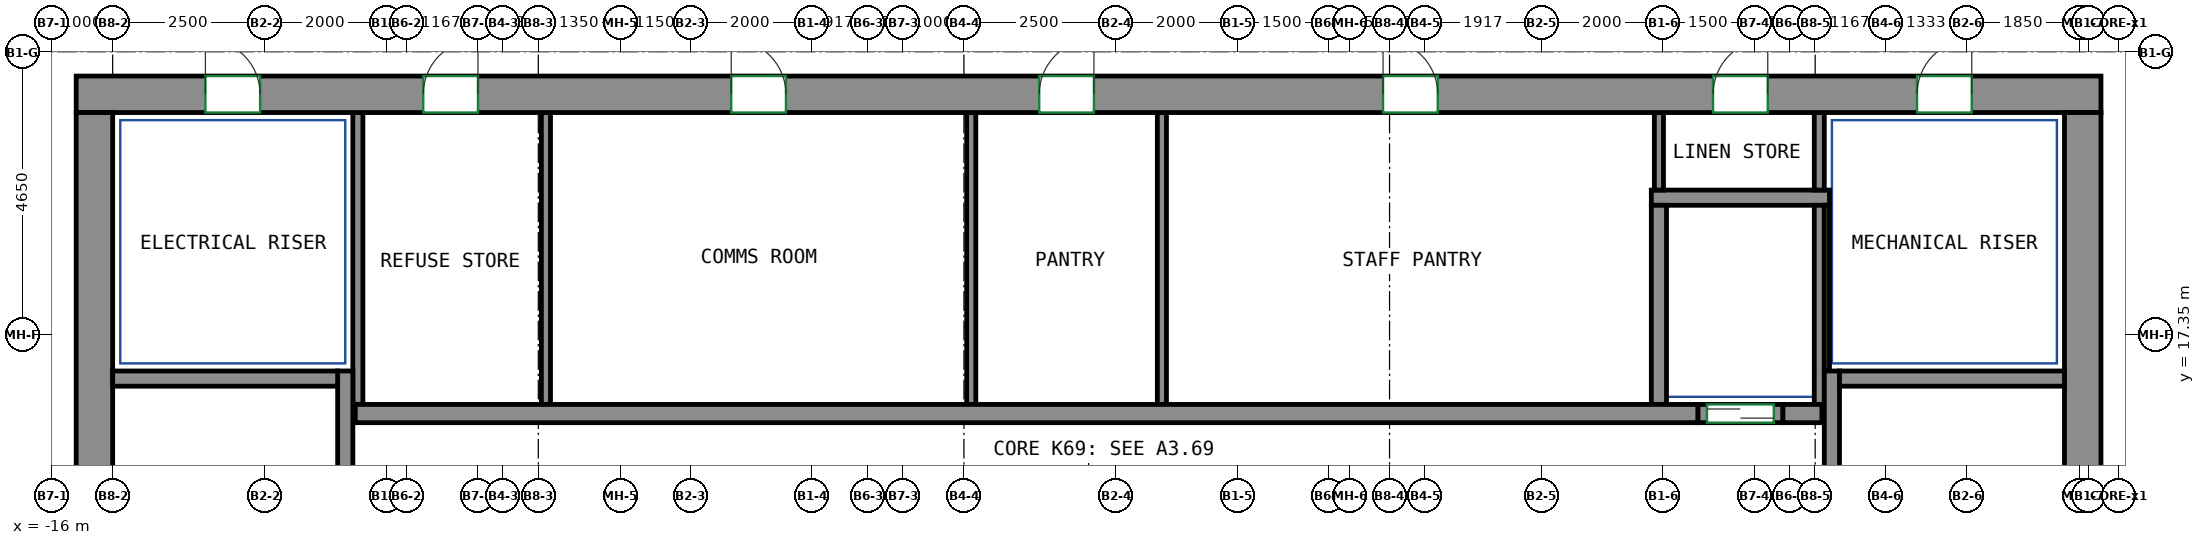
"""IFC4 building model, lengths in metres.
Left out: names, types, materials, properties, quantities, classifications, styles, units other than length and angle.
Written with IfcOpenShell. Run it as: python <this file> out.ifc"""

import sys

from ifc_helpers import new_model, si_unit, direction, frame, frame_2d, origin, place, context, subcontext, project, spatial, rectangle, extrude, source, transform, mapped, element, fill, save


model = new_model("IFC4")
c1 = context("Model", 3, precision=1e-05, world=origin(), true_north=direction((0.0, 1.0)))
c2 = subcontext(c1, "Body", "Model", "MODEL_VIEW")
j1 = project(units=[si_unit("LENGTHUNIT", "METRE"), si_unit("PLANEANGLEUNIT", "RADIAN")], contexts=[c1])
p1 = place(None, origin())
s1 = spatial("IfcSite", under=j1, at=p1, CompositionType="ELEMENT")
p2 = place(p1, origin())
s2 = spatial("IfcBuilding", under=s1, at=p2, CompositionType="ELEMENT")
p3 = place(p2, frame((0.0, 0.0, 277.2)))
s3 = spatial("IfcBuildingStorey", under=s2, at=p3, CompositionType="ELEMENT", Elevation=277.2)
m1 = source(origin(), c2, "Body", "SweptSolid", [
    extrude(rectangle(XDim=33.3, YDim=0.6, at=frame_2d((16.65, 0.0))), origin(), (0.0, 0.0, 1.0), 3.12),
])
p4 = place(p3, frame((-15.6, 21.3, 0.0), z_axis=(0.0, 0.0, 1.0), x_axis=(1.0, 0.0, 0.0)))
e1 = element("IfcWall", 1, at=p4, inside=s3, PredefinedType="SHEAR", context=c2, shape_type="MappedRepresentation", body=[
    mapped(m1, transform((0.0, 0.0, 0.0))),
])
p5 = place(p4, frame((5.708, 0.0, 0.0)))
e2 = element("IfcOpeningElement", 2, at=p5, cuts=e1, PredefinedType="OPENING", context=c2, shape_type="SweptSolid", body=[
    extrude(rectangle(XDim=0.9, YDim=2.1, at=frame_2d((0.45, 1.05))), frame((0.0, 0.31, 0.0), z_axis=(0.0, -1.0, 0.0), x_axis=(1.0, 0.0, 0.0)), (0.0, 0.0, 1.0), 0.62),
])
p6 = place(p4, frame((10.773, 0.0, 0.0)))
e3 = element("IfcOpeningElement", 3, at=p6, cuts=e1, PredefinedType="OPENING", context=c2, shape_type="SweptSolid", body=[
    extrude(rectangle(XDim=0.9, YDim=2.1, at=frame_2d((0.45, 1.05))), frame((0.0, 0.31, 0.0), z_axis=(0.0, -1.0, 0.0), x_axis=(1.0, 0.0, 0.0)), (0.0, 0.0, 1.0), 0.62),
])
p7 = place(p4, frame((15.838, 0.0, 0.0)))
e4 = element("IfcOpeningElement", 4, at=p7, cuts=e1, PredefinedType="OPENING", context=c2, shape_type="SweptSolid", body=[
    extrude(rectangle(XDim=0.9, YDim=2.1, at=frame_2d((0.45, 1.05))), frame((0.0, 0.31, 0.0), z_axis=(0.0, -1.0, 0.0), x_axis=(1.0, 0.0, 0.0)), (0.0, 0.0, 1.0), 0.62),
])
p8 = place(p4, frame((21.493, 0.0, 0.0)))
e5 = element("IfcOpeningElement", 5, at=p8, cuts=e1, PredefinedType="OPENING", context=c2, shape_type="SweptSolid", body=[
    extrude(rectangle(XDim=0.9, YDim=2.1, at=frame_2d((0.45, 1.05))), frame((0.0, 0.31, 0.0), z_axis=(0.0, -1.0, 0.0), x_axis=(1.0, 0.0, 0.0)), (0.0, 0.0, 1.0), 0.62),
])
p9 = place(p4, frame((26.92, 0.0, 0.0)))
e6 = element("IfcOpeningElement", 6, at=p9, cuts=e1, PredefinedType="OPENING", context=c2, shape_type="SweptSolid", body=[
    extrude(rectangle(XDim=0.9, YDim=2.1, at=frame_2d((0.45, 1.05))), frame((0.0, 0.31, 0.0), z_axis=(0.0, -1.0, 0.0), x_axis=(1.0, 0.0, 0.0)), (0.0, 0.0, 1.0), 0.62),
])
p10 = place(p4, frame((2.125, 0.0, 0.0)))
e7 = element("IfcOpeningElement", 7, at=p10, cuts=e1, PredefinedType="OPENING", context=c2, shape_type="SweptSolid", body=[
    extrude(rectangle(XDim=0.9, YDim=2.1, at=frame_2d((0.45, 1.05))), frame((0.0, 0.31, 0.0), z_axis=(0.0, -1.0, 0.0), x_axis=(1.0, 0.0, 0.0)), (0.0, 0.0, 1.0), 0.62),
])
p11 = place(p4, frame((30.275, 0.0, 0.0)))
e8 = element("IfcOpeningElement", 8, at=p11, cuts=e1, PredefinedType="OPENING", context=c2, shape_type="SweptSolid", body=[
    extrude(rectangle(XDim=0.9, YDim=2.1, at=frame_2d((0.45, 1.05))), frame((0.0, 0.31, 0.0), z_axis=(0.0, -1.0, 0.0), x_axis=(1.0, 0.0, 0.0)), (0.0, 0.0, 1.0), 0.62),
])
m2 = source(origin(), c2, "Body", "SweptSolid", [
    extrude(rectangle(XDim=12.0, YDim=0.6, at=frame_2d((6.0, 0.0))), origin(), (0.0, 0.0, 1.0), 3.12),
])
for number, where, z_axis, x_axis in (
    (9, (-15.3, 9.0, 0.0), (0.0, 0.0, 1.0), (0.0, 1.0, 0.0)),
    (10, (17.4, 9.0, 0.0), (0.0, 0.0, 1.0), (0.0, 1.0, 0.0)),
):
    element("IfcWall", number, at=place(p3, frame(where, z_axis=z_axis, x_axis=x_axis)), inside=s3, PredefinedType="SHEAR", context=c2, shape_type="MappedRepresentation", body=[
        mapped(m2, transform((0.0, 0.0, 0.0))),
    ])
m3 = source(origin(), c2, "Body", "SweptSolid", [
    extrude(rectangle(XDim=7.75, YDim=0.25, at=frame_2d((3.875, 0.0))), origin(), (0.0, 0.0, 1.0), 3.12),
])
p12 = place(p3, frame((-11.175, 9.0, 0.0), z_axis=(0.0, 0.0, 1.0), x_axis=(0.0, 1.0, 0.0)))
e11 = element("IfcWall", 11, at=p12, inside=s3, PredefinedType="SHEAR", context=c2, shape_type="MappedRepresentation", body=[
    mapped(m3, transform((0.0, 0.0, 0.0))),
])
m4 = source(origin(), c2, "Body", "SweptSolid", [
    extrude(rectangle(XDim=3.7, YDim=0.25, at=frame_2d((1.85, 0.0))), origin(), (0.0, 0.0, 1.0), 3.12),
])
p13 = place(p3, frame((-15.0, 16.625, 0.0), z_axis=(0.0, 0.0, 1.0), x_axis=(1.0, 0.0, 0.0)))
e12 = element("IfcWall", 12, at=p13, inside=s3, PredefinedType="SHEAR", context=c2, shape_type="MappedRepresentation", body=[
    mapped(m4, transform((0.0, 0.0, 0.0))),
])
p14 = place(p3, frame((13.275, 9.0, 0.0), z_axis=(0.0, 0.0, 1.0), x_axis=(0.0, 1.0, 0.0)))
e13 = element("IfcWall", 13, at=p14, inside=s3, PredefinedType="SHEAR", context=c2, shape_type="MappedRepresentation", body=[
    mapped(m3, transform((0.0, 0.0, 0.0))),
])
m5 = source(origin(), c2, "Body", "SweptSolid", [
    extrude(rectangle(XDim=3.7, YDim=0.25, at=frame_2d((1.85, 0.0))), origin(), (0.0, 0.0, 1.0), 3.12),
])
p15 = place(p3, frame((13.4, 16.625, 0.0), z_axis=(0.0, 0.0, 1.0), x_axis=(1.0, 0.0, 0.0)))
e14 = element("IfcWall", 14, at=p15, inside=s3, PredefinedType="SHEAR", context=c2, shape_type="MappedRepresentation", body=[
    mapped(m5, transform((0.0, 0.0, 0.0))),
])
m6 = source(origin(), c2, "Body", "SweptSolid", [
    extrude(rectangle(XDim=22.08, YDim=0.3, at=frame_2d((11.04, 0.0))), origin(), (0.0, 0.0, 1.0), 3.12),
])
p16 = place(p3, frame((-11.01, 16.05, 0.0), z_axis=(0.0, 0.0, 1.0), x_axis=(1.0, 0.0, 0.0)))
e15 = element("IfcWall", 15, at=p16, inside=s3, PredefinedType="SHEAR", context=c2, shape_type="MappedRepresentation", body=[
    mapped(m6, transform((0.0, 0.0, 0.0))),
])
m7 = source(origin(), c2, "Body", "SweptSolid", [
    extrude(rectangle(XDim=0.64, YDim=0.3, at=frame_2d((0.32, 0.0))), origin(), (0.0, 0.0, 1.0), 3.12),
])
p17 = place(p3, frame((12.47, 16.05, 0.0), z_axis=(0.0, 0.0, 1.0), x_axis=(1.0, 0.0, 0.0)))
e16 = element("IfcWall", 16, at=p17, inside=s3, PredefinedType="SHEAR", context=c2, shape_type="MappedRepresentation", body=[
    mapped(m7, transform((0.0, 0.0, 0.0))),
])
m8 = source(origin(), c2, "Body", "SweptSolid", [
    extrude(rectangle(XDim=1.4, YDim=0.3, at=frame_2d((0.7, 0.0))), origin(), (0.0, 0.0, 1.0), 3.12),
])
p18 = place(p3, frame((11.07, 16.05, 0.0), z_axis=(0.0, 0.0, 1.0), x_axis=(1.0, 0.0, 0.0)))
e17 = element("IfcWall", 17, at=p18, inside=s3, PredefinedType="PARTITIONING", context=c2, shape_type="MappedRepresentation", body=[
    mapped(m8, transform((0.0, 0.0, 0.0))),
])
p19 = place(p18, frame((0.15, 0.0, 0.0)))
e18 = element("IfcOpeningElement", 18, at=p19, cuts=e17, PredefinedType="OPENING", context=c2, shape_type="SweptSolid", body=[
    extrude(rectangle(XDim=1.1, YDim=2.1, at=frame_2d((0.55, 1.05))), frame((0.0, 0.16, 0.0), z_axis=(0.0, -1.0, 0.0), x_axis=(1.0, 0.0, 0.0)), (0.0, 0.0, 1.0), 0.32),
])
m9 = source(origin(), c2, "Body", "SweptSolid", [
    extrude(rectangle(XDim=2.93, YDim=0.25, at=frame_2d((1.465, 0.0))), origin(), (0.0, 0.0, 1.0), 3.12),
])
p20 = place(p3, frame((10.305, 19.6, 0.0), z_axis=(0.0, 0.0, 1.0), x_axis=(1.0, 0.0, 0.0)))
e19 = element("IfcWall", 19, at=p20, inside=s3, PredefinedType="PARTITIONING", context=c2, shape_type="MappedRepresentation", body=[
    mapped(m9, transform((0.0, 0.0, 0.0))),
])
m10 = source(origin(), c2, "Body", "SweptSolid", [
    extrude(rectangle(XDim=3.275, YDim=0.165, at=frame_2d((1.638, 0.0))), origin(), (0.0, 0.0, 1.0), 3.12),
])
p21 = place(p3, frame((13.067, 16.2, 0.0), z_axis=(0.0, 0.0, 1.0), x_axis=(0.0, 1.0, 0.0)))
e20 = element("IfcWall", 20, at=p21, inside=s3, PredefinedType="PARTITIONING", context=c2, shape_type="MappedRepresentation", body=[
    mapped(m10, transform((0.0, 0.0, 0.0))),
])
m11 = source(origin(), c2, "Body", "SweptSolid", [
    extrude(rectangle(XDim=1.275, YDim=0.165, at=frame_2d((0.637, 0.0))), origin(), (0.0, 0.0, 1.0), 3.12),
])
p22 = place(p3, frame((13.067, 19.725, 0.0), z_axis=(0.0, 0.0, 1.0), x_axis=(0.0, 1.0, 0.0)))
e21 = element("IfcWall", 21, at=p22, inside=s3, PredefinedType="PARTITIONING", context=c2, shape_type="MappedRepresentation", body=[
    mapped(m11, transform((0.0, 0.0, 0.0))),
])
m12 = source(origin(), c2, "Body", "SweptSolid", [
    extrude(rectangle(XDim=4.8, YDim=0.165, at=frame_2d((2.4, 0.0))), origin(), (0.0, 0.0, 1.0), 3.12),
])
p23 = place(p3, frame((-10.968, 16.2, 0.0), z_axis=(0.0, 0.0, 1.0), x_axis=(0.0, 1.0, 0.0)))
e22 = element("IfcWall", 22, at=p23, inside=s3, PredefinedType="PARTITIONING", context=c2, shape_type="MappedRepresentation", body=[
    mapped(m12, transform((0.0, 0.0, 0.0))),
])
m13 = source(origin(), c2, "Body", "SweptSolid", [
    extrude(rectangle(XDim=3.275, YDim=0.25, at=frame_2d((1.638, 0.0))), origin(), (0.0, 0.0, 1.0), 3.12),
])
p24 = place(p3, frame((10.43, 16.2, 0.0), z_axis=(0.0, 0.0, 1.0), x_axis=(0.0, 1.0, 0.0)))
e23 = element("IfcWall", 23, at=p24, inside=s3, PredefinedType="PARTITIONING", context=c2, shape_type="MappedRepresentation", body=[
    mapped(m13, transform((0.0, 0.0, 0.0))),
])
m14 = source(origin(), c2, "Body", "SweptSolid", [
    extrude(rectangle(XDim=2.725, YDim=0.085, at=frame_2d((1.363, 0.0))), origin(), (0.0, 0.0, 1.0), 3.12),
])
p25 = place(p3, frame((13.192, 16.75, 0.0), z_axis=(0.0, 0.0, 1.0), x_axis=(0.0, 1.0, 0.0)))
e24 = element("IfcWall", 24, at=p25, inside=s3, PredefinedType="PARTITIONING", context=c2, shape_type="MappedRepresentation", body=[
    mapped(m14, transform((0.0, 0.0, 0.0))),
])
m15 = source(origin(), c2, "Body", "SweptSolid", [
    extrude(rectangle(XDim=4.8, YDim=0.15, at=frame_2d((2.4, 0.0))), origin(), (0.0, 0.0, 1.0), 3.12),
])
for number, where, z_axis, x_axis in (
    (25, (-7.875, 16.2, 0.0), (0.0, 0.0, 1.0), (0.0, 1.0, 0.0)),
    (26, (-0.88, 16.2, 0.0), (0.0, 0.0, 1.0), (0.0, 1.0, 0.0)),
    (27, (2.256, 16.2, 0.0), (0.0, 0.0, 1.0), (0.0, 1.0, 0.0)),
):
    element("IfcWall", number, at=place(p3, frame(where, z_axis=z_axis, x_axis=x_axis)), inside=s3, PredefinedType="PARTITIONING", context=c2, shape_type="MappedRepresentation", body=[
        mapped(m15, transform((0.0, 0.0, 0.0))),
    ])
m16 = source(origin(), c2, "Body", "SweptSolid", [
    extrude(rectangle(XDim=1.275, YDim=0.15, at=frame_2d((0.637, 0.0))), origin(), (0.0, 0.0, 1.0), 3.12),
])
p26 = place(p3, frame((10.43, 19.725, 0.0), z_axis=(0.0, 0.0, 1.0), x_axis=(0.0, 1.0, 0.0)))
e28 = element("IfcWall", 28, at=p26, inside=s3, PredefinedType="PARTITIONING", context=c2, shape_type="MappedRepresentation", body=[
    mapped(m16, transform((0.0, 0.0, 0.0))),
])
p27 = place(p19, origin())
e29 = element("IfcDoor", 29, at=p27, inside=s3, OperationType="DOUBLE_DOOR_SLIDING", PredefinedType="DOOR", context=c2, shape_type="SweptSolid", body=[
    extrude(rectangle(XDim=1.1, YDim=2.1, at=frame_2d((0.55, 1.05))), frame((0.0, 0.025, 0.0), z_axis=(0.0, -1.0, 0.0), x_axis=(1.0, 0.0, 0.0)), (0.0, 0.0, 1.0), 0.05),
])
fill(e18, e29)
p28 = place(p5, origin())
e30 = element("IfcDoor", 30, at=p28, inside=s3, OperationType="SINGLE_SWING_RIGHT", PredefinedType="DOOR", context=c2, shape_type="SweptSolid", body=[
    extrude(rectangle(XDim=0.9, YDim=2.1, at=frame_2d((0.45, 1.05))), frame((0.0, -0.155, 0.0), z_axis=(0.0, -1.0, 0.0), x_axis=(1.0, 0.0, 0.0)), (0.0, 0.0, 1.0), 0.05),
])
fill(e2, e30)
p29 = place(p6, origin())
e31 = element("IfcDoor", 31, at=p29, inside=s3, OperationType="SINGLE_SWING_LEFT", PredefinedType="DOOR", context=c2, shape_type="SweptSolid", body=[
    extrude(rectangle(XDim=0.9, YDim=2.1, at=frame_2d((0.45, 1.05))), frame((0.0, -0.155, 0.0), z_axis=(0.0, -1.0, 0.0), x_axis=(1.0, 0.0, 0.0)), (0.0, 0.0, 1.0), 0.05),
])
fill(e3, e31)
p30 = place(p7, origin())
e32 = element("IfcDoor", 32, at=p30, inside=s3, OperationType="SINGLE_SWING_RIGHT", PredefinedType="DOOR", context=c2, shape_type="SweptSolid", body=[
    extrude(rectangle(XDim=0.9, YDim=2.1, at=frame_2d((0.45, 1.05))), frame((0.0, -0.155, 0.0), z_axis=(0.0, -1.0, 0.0), x_axis=(1.0, 0.0, 0.0)), (0.0, 0.0, 1.0), 0.05),
])
fill(e4, e32)
p31 = place(p8, origin())
e33 = element("IfcDoor", 33, at=p31, inside=s3, OperationType="SINGLE_SWING_LEFT", PredefinedType="DOOR", context=c2, shape_type="SweptSolid", body=[
    extrude(rectangle(XDim=0.9, YDim=2.1, at=frame_2d((0.45, 1.05))), frame((0.0, -0.155, 0.0), z_axis=(0.0, -1.0, 0.0), x_axis=(1.0, 0.0, 0.0)), (0.0, 0.0, 1.0), 0.05),
])
fill(e5, e33)
p32 = place(p9, origin())
e34 = element("IfcDoor", 34, at=p32, inside=s3, OperationType="SINGLE_SWING_RIGHT", PredefinedType="DOOR", context=c2, shape_type="SweptSolid", body=[
    extrude(rectangle(XDim=0.9, YDim=2.1, at=frame_2d((0.45, 1.05))), frame((0.0, -0.155, 0.0), z_axis=(0.0, -1.0, 0.0), x_axis=(1.0, 0.0, 0.0)), (0.0, 0.0, 1.0), 0.05),
])
fill(e6, e34)
p33 = place(p10, origin())
e35 = element("IfcDoor", 35, at=p33, inside=s3, OperationType="SINGLE_SWING_LEFT", PredefinedType="DOOR", context=c2, shape_type="SweptSolid", body=[
    extrude(rectangle(XDim=0.9, YDim=2.1, at=frame_2d((0.45, 1.05))), frame((0.0, -0.155, 0.0), z_axis=(0.0, -1.0, 0.0), x_axis=(1.0, 0.0, 0.0)), (0.0, 0.0, 1.0), 0.05),
])
fill(e7, e35)
p34 = place(p11, origin())
e36 = element("IfcDoor", 36, at=p34, inside=s3, OperationType="SINGLE_SWING_RIGHT", PredefinedType="DOOR", context=c2, shape_type="SweptSolid", body=[
    extrude(rectangle(XDim=0.9, YDim=2.1, at=frame_2d((0.45, 1.05))), frame((0.0, -0.155, 0.0), z_axis=(0.0, -1.0, 0.0), x_axis=(1.0, 0.0, 0.0)), (0.0, 0.0, 1.0), 0.05),
])
fill(e8, e36)
save(model, sys.argv[1])
